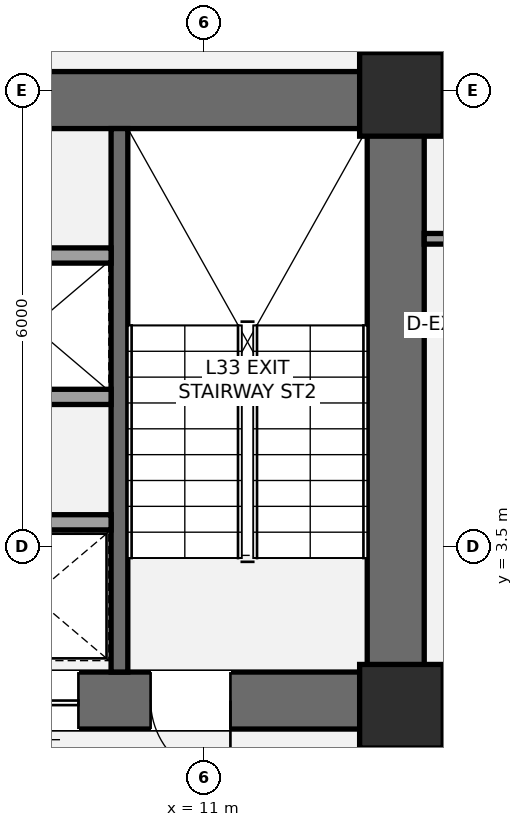
"""IFC4 building model, lengths in metres.
Left out: names, types, materials, properties, quantities, classifications, styles, units other than length and angle.
Written with IfcOpenShell. Run it as: python <this file> out.ifc"""

import sys

from ifc_helpers import new_model, si_unit, direction, frame, frame_2d, origin, origin_2d, place, context, subcontext, project, spatial, rectangle, extrude, element, fill, save


model = new_model("IFC4")
c1 = context("Model", 3, precision=1e-05, world=origin(), true_north=direction((0.0, 1.0)))
c2 = subcontext(c1, "Body", "Model", "MODEL_VIEW")
j1 = project(units=[si_unit("LENGTHUNIT", "METRE"), si_unit("PLANEANGLEUNIT", "RADIAN")], contexts=[c1])
p1 = place(None, origin())
s1 = spatial("IfcSite", under=j1, at=p1, CompositionType="ELEMENT")
p2 = place(p1, origin())
s2 = spatial("IfcBuilding", under=s1, at=p2, CompositionType="ELEMENT")
p3 = place(p2, frame((0.0, 0.0, 124.6)))
s3 = spatial("IfcBuildingStorey", under=s2, at=p3, CompositionType="ELEMENT", Elevation=124.6)
p4 = place(p3, frame((13.525, 1.1, 0.0), z_axis=(0.0, 0.0, 1.0), x_axis=(0.0, 1.0, 0.0)))
e1 = element("IfcWall", 1, at=p4, inside=s3, PredefinedType="SHEAR", context=c2, shape_type="SweptSolid", body=[
    extrude(rectangle(XDim=8.65, YDim=0.75, at=frame_2d((4.325, 0.0))), origin(), (0.0, 0.0, 1.0), 3.5),
])
p5 = place(p3, frame((4.425, 9.375, 0.0), z_axis=(0.0, 0.0, 1.0), x_axis=(1.0, 0.0, 0.0)))
e2 = element("IfcWall", 2, at=p5, inside=s3, PredefinedType="SHEAR", context=c2, shape_type="SweptSolid", body=[
    extrude(rectangle(XDim=9.475, YDim=0.75, at=frame_2d((4.737, 0.0))), origin(), (0.0, 0.0, 1.0), 3.5),
])
p6 = place(p3, frame((13.9, 1.475, 0.0), z_axis=(0.0, 0.0, 1.0), x_axis=(-1.0, 0.0, 0.0)))
e3 = element("IfcWall", 3, at=p6, inside=s3, PredefinedType="SHEAR", context=c2, shape_type="SweptSolid", body=[
    extrude(rectangle(XDim=9.075, YDim=0.75, at=frame_2d((4.538, 0.0))), origin(), (0.0, 0.0, 1.0), 3.5),
])
p7 = place(p6, frame((2.55, 0.0, 0.0)))
e4 = element("IfcOpeningElement", 4, at=p7, cuts=e3, PredefinedType="OPENING", context=c2, shape_type="SweptSolid", body=[
    extrude(rectangle(XDim=1.05, YDim=2.15, at=frame_2d((0.525, 1.075))), frame((0.0, 0.385, 0.0), z_axis=(0.0, -1.0, 0.0), x_axis=(1.0, 0.0, 0.0)), (0.0, 0.0, 1.0), 0.77),
])
p8 = place(p6, frame((4.55, 0.0, 0.0)))
e5 = element("IfcOpeningElement", 5, at=p8, cuts=e3, PredefinedType="OPENING", context=c2, shape_type="SweptSolid", body=[
    extrude(rectangle(XDim=1.1, YDim=2.2, at=frame_2d((0.55, 1.1))), frame((0.0, 0.385, 0.0), z_axis=(0.0, -1.0, 0.0), x_axis=(1.0, 0.0, 0.0)), (0.0, 0.0, 1.0), 0.77),
])
p9 = place(p3, frame((9.89, 1.85, 0.0), z_axis=(0.0, 0.0, 1.0), x_axis=(0.0, 1.0, 0.0)))
e6 = element("IfcWall", 6, at=p9, inside=s3, PredefinedType="SHEAR", context=c2, shape_type="SweptSolid", body=[
    extrude(rectangle(XDim=7.15, YDim=0.22, at=frame_2d((3.575, 0.0))), origin(), (0.0, 0.0, 1.0), 3.5),
])
for number, where, z_axis, x_axis in (
    (7, (13.6, 1.4, 0.0), (0.0, 0.0, 1.0), (1.0, 0.0, 0.0)),
    (8, (13.6, 9.45, 0.0), (0.0, 0.0, 1.0), (1.0, 0.0, 0.0)),
):
    element("IfcColumn", number, at=place(p3, frame(where, z_axis=z_axis, x_axis=x_axis)), inside=s3, PredefinedType="COLUMN", context=c2, shape_type="SweptSolid", body=[
        extrude(rectangle(XDim=1.1, YDim=1.1, at=origin_2d()), origin(), (0.0, 0.0, 1.0), 3.5),
    ])
p10 = place(p3, frame((13.45, -2.15, 0.0), z_axis=(0.0, 0.0, 1.0), x_axis=(0.0, 1.0, 0.0)))
e9 = element("IfcWall", 9, at=p10, inside=s3, PredefinedType="PARTITIONING", context=c2, shape_type="SweptSolid", body=[
    extrude(rectangle(XDim=3.3, YDim=0.165, at=frame_2d((1.65, 0.0))), origin(), (0.0, 0.0, 1.0), 2.763),
])
p11 = place(p10, frame((1.15, 0.0, 0.0)))
e10 = element("IfcOpeningElement", 10, at=p11, cuts=e9, PredefinedType="OPENING", context=c2, shape_type="SweptSolid", body=[
    extrude(rectangle(XDim=1.05, YDim=2.15, at=frame_2d((0.525, 1.075))), frame((0.0, 0.093, 0.0), z_axis=(0.0, -1.0, 0.0), x_axis=(1.0, 0.0, 0.0)), (0.0, 0.0, 1.0), 0.185),
])
p12 = place(p3, frame((5.575, 3.82, 0.0), z_axis=(0.0, 0.0, 1.0), x_axis=(1.0, 0.0, 0.0)))
e11 = element("IfcWall", 11, at=p12, inside=s3, PredefinedType="SOLIDWALL", context=c2, shape_type="SweptSolid", body=[
    extrude(rectangle(XDim=4.205, YDim=0.2, at=frame_2d((2.103, 0.0))), origin(), (0.0, 0.0, 1.0), 3.31),
])
p13 = place(p12, frame((0.65, 0.0, 0.0)))
e12 = element("IfcOpeningElement", 12, at=p13, cuts=e11, PredefinedType="OPENING", context=c2, shape_type="SweptSolid", body=[
    extrude(rectangle(XDim=1.2, YDim=2.2, at=frame_2d((0.6, 1.1))), frame((0.0, 0.11, 0.0), z_axis=(0.0, -1.0, 0.0), x_axis=(1.0, 0.0, 0.0)), (0.0, 0.0, 1.0), 0.22),
])
for number, where, z_axis, x_axis in (
    (13, (5.575, 5.47, 0.0), (0.0, 0.0, 1.0), (1.0, 0.0, 0.0)),
    (14, (5.575, 7.33, 0.0), (0.0, 0.0, 1.0), (1.0, 0.0, 0.0)),
):
    element("IfcWall", number, at=place(p3, frame(where, z_axis=z_axis, x_axis=x_axis)), inside=s3, PredefinedType="SOLIDWALL", context=c2, shape_type="SweptSolid", body=[
        extrude(rectangle(XDim=4.205, YDim=0.2, at=frame_2d((2.103, 0.0))), origin(), (0.0, 0.0, 1.0), 3.31),
    ])
p14 = place(p3, frame((13.9, 7.55, 0.0), z_axis=(0.0, 0.0, 1.0), x_axis=(1.0, 0.0, 0.0)))
e15 = element("IfcWall", 15, at=p14, inside=s3, PredefinedType="PARTITIONING", context=c2, shape_type="SweptSolid", body=[
    extrude(rectangle(XDim=3.9, YDim=0.14, at=frame_2d((1.95, 0.0))), origin(), (0.0, 0.0, 1.0), 2.763),
])
p15 = place(p14, frame((0.32, 0.0, 0.0)))
e16 = element("IfcOpeningElement", 16, at=p15, cuts=e15, PredefinedType="OPENING", context=c2, shape_type="SweptSolid", body=[
    extrude(rectangle(XDim=0.92, YDim=2.15, at=frame_2d((0.46, 1.075))), frame((0.0, 0.08, 0.0), z_axis=(0.0, -1.0, 0.0), x_axis=(1.0, 0.0, 0.0)), (0.0, 0.0, 1.0), 0.16),
])
p16 = place(p7, origin())
e17 = element("IfcDoor", 17, at=p16, inside=s3, OperationType="SINGLE_SWING_LEFT", PredefinedType="DOOR", context=c2, shape_type="SweptSolid", body=[
    extrude(rectangle(XDim=1.05, YDim=2.15, at=frame_2d((0.525, 1.075))), frame((0.0, 0.025, 0.0), z_axis=(0.0, -1.0, 0.0), x_axis=(1.0, 0.0, 0.0)), (0.0, 0.0, 1.0), 0.05),
])
fill(e4, e17)
p17 = place(p8, origin())
e18 = element("IfcDoor", 18, at=p17, inside=s3, OperationType="SLIDING_TO_LEFT", PredefinedType="DOOR", context=c2, shape_type="SweptSolid", body=[
    extrude(rectangle(XDim=1.1, YDim=2.2, at=frame_2d((0.55, 1.1))), frame((0.0, 0.025, 0.0), z_axis=(0.0, -1.0, 0.0), x_axis=(1.0, 0.0, 0.0)), (0.0, 0.0, 1.0), 0.05),
])
fill(e5, e18)
save(model, sys.argv[1])
